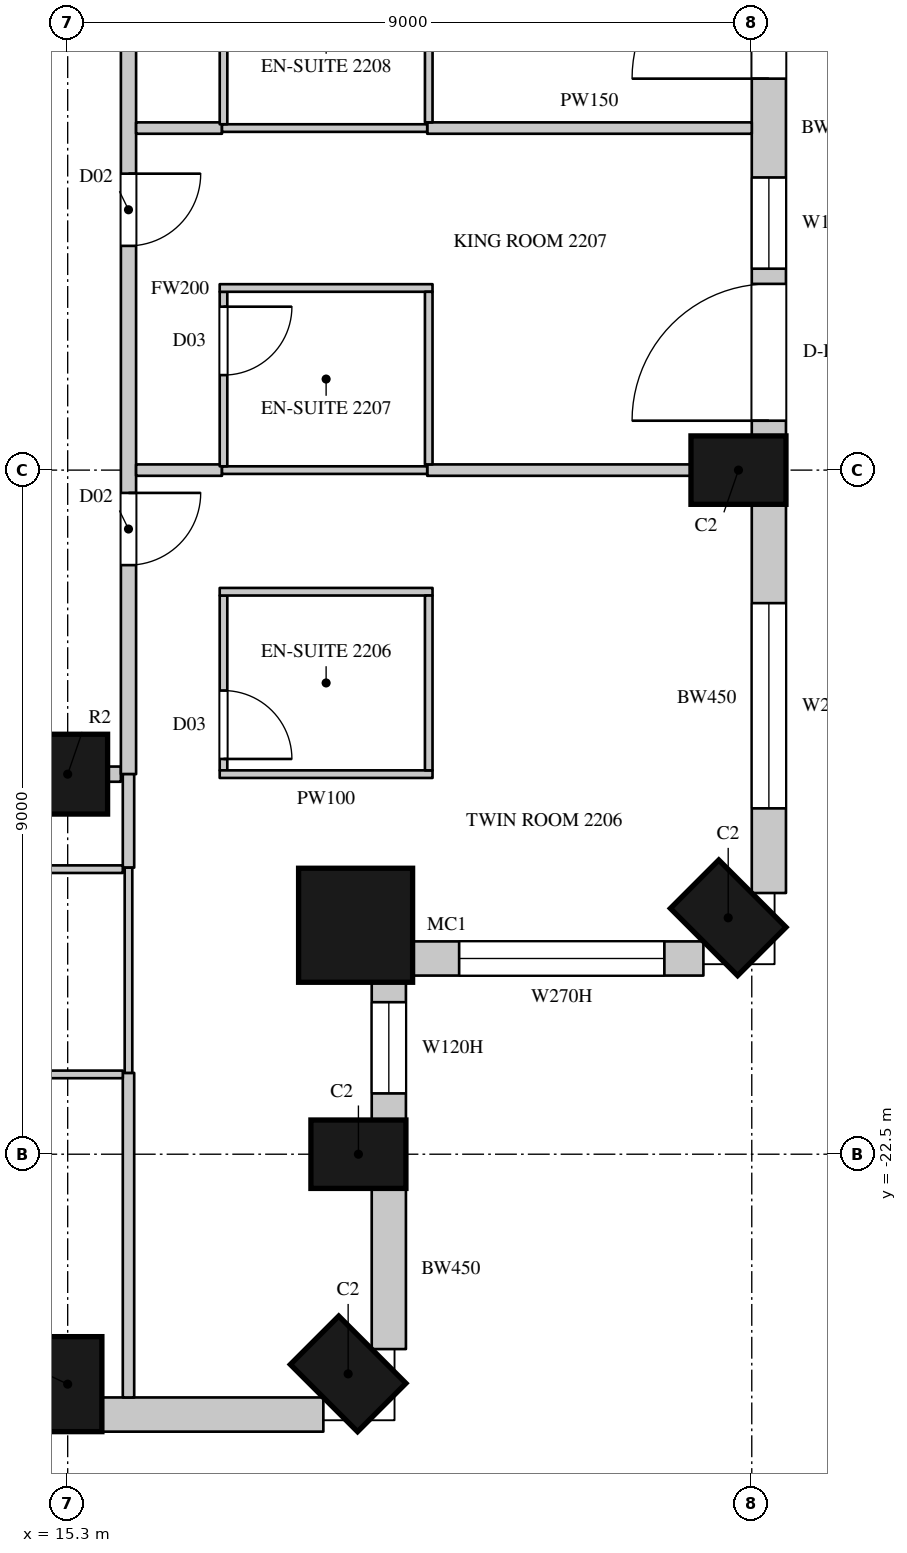
"""IFC4 building model, lengths in metres.
Left out: names, types, materials, properties, quantities, classifications, styles, units other than length and angle.
Written with IfcOpenShell. Run it as: python <this file> out.ifc"""

import sys

from ifc_helpers import new_model, si_unit, direction, frame, frame_2d, origin, origin_2d, place, context, subcontext, project, spatial, rectangle, circle, extrude, element, fill, save


model = new_model("IFC4")
c1 = context("Model", 3, precision=1e-05, world=origin(), true_north=direction((0.0, 1.0)))
c2 = subcontext(c1, "Body", "Model", "MODEL_VIEW")
j1 = project(units=[si_unit("LENGTHUNIT", "METRE"), si_unit("PLANEANGLEUNIT", "RADIAN")], contexts=[c1])
p1 = place(None, origin())
s1 = spatial("IfcSite", under=j1, at=p1, CompositionType="ELEMENT")
p2 = place(p1, origin())
s2 = spatial("IfcBuilding", under=s1, at=p2, CompositionType="ELEMENT")
p3 = place(p2, frame((0.0, 0.0, 109.5)))
s3 = spatial("IfcBuildingStorey", under=s2, at=p3, CompositionType="ELEMENT", Elevation=109.5)
for number, where, z_axis, x_axis in (
    (1, (15.3, -25.525, 0.0), (0.0, 0.0, 1.0), (1.0, 0.0, 0.0)),
    (2, (18.99, -25.39, 0.0), (0.0, 0.0, 1.0), (0.707, 0.707, 0.0)),
    (3, (19.125, -22.5, 0.0), (0.0, 0.0, 1.0), (0.0, 1.0, 0.0)),
):
    element("IfcColumn", number, at=place(p3, frame(where, z_axis=z_axis, x_axis=x_axis)), inside=s3, PredefinedType="COLUMN", context=c2, shape_type="SweptSolid", body=[
        extrude(rectangle(XDim=0.9, YDim=1.25, at=origin_2d()), origin(), (0.0, 0.0, 1.0), 3.6),
    ])
p4 = place(p3, frame((19.088, -19.488, 0.0), z_axis=(0.0, 0.0, 1.0), x_axis=(1.0, 0.0, 0.0)))
e4 = element("IfcColumn", 4, at=p4, inside=s3, PredefinedType="COLUMN", context=c2, shape_type="SweptSolid", body=[
    extrude(circle(Radius=0.75, at=origin_2d()), origin(), (0.0, 0.0, 1.0), 3.6),
])
for number, where, z_axis, x_axis in (
    (5, (23.99, -19.39, 0.0), (0.0, 0.0, 1.0), (0.707, 0.707, 0.0)),
    (6, (24.125, -13.5, 0.0), (0.0, 0.0, 1.0), (0.0, 1.0, 0.0)),
):
    element("IfcColumn", number, at=place(p3, frame(where, z_axis=z_axis, x_axis=x_axis)), inside=s3, PredefinedType="COLUMN", context=c2, shape_type="SweptSolid", body=[
        extrude(rectangle(XDim=0.9, YDim=1.25, at=origin_2d()), origin(), (0.0, 0.0, 1.0), 3.6),
    ])
p5 = place(p3, frame((15.3, -17.5, 0.0), z_axis=(0.0, 0.0, 1.0), x_axis=(1.0, 0.0, 0.0)))
e7 = element("IfcColumn", 7, at=p5, inside=s3, PredefinedType="COLUMN", context=c2, shape_type="SweptSolid", body=[
    extrude(circle(Radius=0.525, at=origin_2d()), origin(), (0.0, 0.0, 1.0), 3.6),
])
p6 = place(p3, frame((15.75, -25.925, 0.0), z_axis=(0.0, 0.0, 1.0), x_axis=(1.0, 0.0, 0.0)))
e8 = element("IfcWall", 8, at=p6, inside=s3, PredefinedType="SOLIDWALL", context=c2, shape_type="SweptSolid", body=[
    extrude(rectangle(XDim=2.914, YDim=0.45, at=frame_2d((1.457, 0.0))), origin(), (0.0, 0.0, 1.0), 3.3),
])
p7 = place(p3, frame((19.525, -25.064, 0.0), z_axis=(0.0, 0.0, 1.0), x_axis=(0.0, 1.0, 0.0)))
e9 = element("IfcWall", 9, at=p7, inside=s3, PredefinedType="SOLIDWALL", context=c2, shape_type="SweptSolid", body=[
    extrude(rectangle(XDim=2.114, YDim=0.45, at=frame_2d((1.057, 0.0))), origin(), (0.0, 0.0, 1.0), 3.3),
])
p8 = place(p3, frame((19.525, -22.05, 0.0), z_axis=(0.0, 0.0, 1.0), x_axis=(0.0, 1.0, 0.0)))
e10 = element("IfcWall", 10, at=p8, inside=s3, PredefinedType="SOLIDWALL", context=c2, shape_type="SweptSolid", body=[
    extrude(rectangle(XDim=1.843, YDim=0.45, at=frame_2d((0.921, 0.0))), origin(), (0.0, 0.0, 1.0), 3.3),
])
p9 = place(p8, frame((0.35, 0.0, 1.05)))
e11 = element("IfcOpeningElement", 11, at=p9, cuts=e10, PredefinedType="OPENING", context=c2, shape_type="SweptSolid", body=[
    extrude(rectangle(XDim=1.2, YDim=2.0, at=frame_2d((0.6, 1.0))), frame((0.0, 0.235, 0.0), z_axis=(0.0, -1.0, 0.0), x_axis=(1.0, 0.0, 0.0)), (0.0, 0.0, 1.0), 0.47),
])
p10 = place(p3, frame((19.807, -19.925, 0.0), z_axis=(0.0, 0.0, 1.0), x_axis=(1.0, 0.0, 0.0)))
e12 = element("IfcWall", 12, at=p10, inside=s3, PredefinedType="SOLIDWALL", context=c2, shape_type="SweptSolid", body=[
    extrude(rectangle(XDim=3.857, YDim=0.45, at=frame_2d((1.928, 0.0))), origin(), (0.0, 0.0, 1.0), 3.3),
])
p11 = place(p10, frame((0.643, 0.0, 1.05)))
e13 = element("IfcOpeningElement", 13, at=p11, cuts=e12, PredefinedType="OPENING", context=c2, shape_type="SweptSolid", body=[
    extrude(rectangle(XDim=2.7, YDim=2.0, at=frame_2d((1.35, 1.0))), frame((0.0, 0.235, 0.0), z_axis=(0.0, -1.0, 0.0), x_axis=(1.0, 0.0, 0.0)), (0.0, 0.0, 1.0), 0.47),
])
p12 = place(p3, frame((24.525, -19.064, 0.0), z_axis=(0.0, 0.0, 1.0), x_axis=(0.0, 1.0, 0.0)))
e14 = element("IfcWall", 14, at=p12, inside=s3, PredefinedType="SOLIDWALL", context=c2, shape_type="SweptSolid", body=[
    extrude(rectangle(XDim=5.114, YDim=0.45, at=frame_2d((2.557, 0.0))), origin(), (0.0, 0.0, 1.0), 3.3),
])
p13 = place(p12, frame((1.114, 0.0, 1.05)))
e15 = element("IfcOpeningElement", 15, at=p13, cuts=e14, PredefinedType="OPENING", context=c2, shape_type="SweptSolid", body=[
    extrude(rectangle(XDim=2.7, YDim=2.0, at=frame_2d((1.35, 1.0))), frame((0.0, 0.235, 0.0), z_axis=(0.0, -1.0, 0.0), x_axis=(1.0, 0.0, 0.0)), (0.0, 0.0, 1.0), 0.47),
])
p14 = place(p3, frame((24.525, -13.05, 0.0), z_axis=(0.0, 0.0, 1.0), x_axis=(0.0, 1.0, 0.0)))
e16 = element("IfcWall", 16, at=p14, inside=s3, PredefinedType="SOLIDWALL", context=c2, shape_type="SweptSolid", body=[
    extrude(rectangle(XDim=8.1, YDim=0.45, at=frame_2d((4.05, 0.0))), origin(), (0.0, 0.0, 1.0), 3.3),
])
p15 = place(p14, frame((0.2, 0.0, 0.0)))
e17 = element("IfcOpeningElement", 17, at=p15, cuts=e16, PredefinedType="OPENING", context=c2, shape_type="SweptSolid", body=[
    extrude(rectangle(XDim=1.8, YDim=2.4, at=frame_2d((0.9, 1.2))), frame((0.0, 0.235, 0.0), z_axis=(0.0, -1.0, 0.0), x_axis=(1.0, 0.0, 0.0)), (0.0, 0.0, 1.0), 0.47),
])
p16 = place(p14, frame((2.2, 0.0, 1.05)))
e18 = element("IfcOpeningElement", 18, at=p16, cuts=e16, PredefinedType="OPENING", context=c2, shape_type="SweptSolid", body=[
    extrude(rectangle(XDim=1.2, YDim=2.0, at=frame_2d((0.6, 1.0))), frame((0.0, 0.235, 0.0), z_axis=(0.0, -1.0, 0.0), x_axis=(1.0, 0.0, 0.0)), (0.0, 0.0, 1.0), 0.47),
])
p17 = place(p14, frame((4.7, 0.0, 0.0)))
e19 = element("IfcOpeningElement", 19, at=p17, cuts=e16, PredefinedType="OPENING", context=c2, shape_type="SweptSolid", body=[
    extrude(rectangle(XDim=1.8, YDim=2.4, at=frame_2d((0.9, 1.2))), frame((0.0, 0.235, 0.0), z_axis=(0.0, -1.0, 0.0), x_axis=(1.0, 0.0, 0.0)), (0.0, 0.0, 1.0), 0.47),
])
p18 = place(p14, frame((6.7, 0.0, 1.05)))
e20 = element("IfcOpeningElement", 20, at=p18, cuts=e16, PredefinedType="OPENING", context=c2, shape_type="SweptSolid", body=[
    extrude(rectangle(XDim=1.2, YDim=2.0, at=frame_2d((0.6, 1.0))), frame((0.0, 0.235, 0.0), z_axis=(0.0, -1.0, 0.0), x_axis=(1.0, 0.0, 0.0)), (0.0, 0.0, 1.0), 0.47),
])
p19 = place(p3, frame((15.825, -17.5, 0.0), z_axis=(0.0, 0.0, 1.0), x_axis=(1.0, 0.0, 0.0)))
e21 = element("IfcWall", 21, at=p19, inside=s3, PredefinedType="PARTITIONING", context=c2, shape_type="SweptSolid", body=[
    extrude(rectangle(XDim=0.175, YDim=0.2, at=frame_2d((0.087, 0.0))), origin(), (0.0, 0.0, 1.0), 3.3),
])
p20 = place(p3, frame((16.1, -17.5, 0.0), z_axis=(0.0, 0.0, 1.0), x_axis=(0.0, 1.0, 0.0)))
e22 = element("IfcWall", 22, at=p20, inside=s3, PredefinedType="PARTITIONING", context=c2, shape_type="SweptSolid", body=[
    extrude(rectangle(XDim=12.75, YDim=0.2, at=frame_2d((6.375, 0.0))), origin(), (0.0, 0.0, 1.0), 3.3),
])
p21 = place(p20, frame((2.75, 0.0, 0.0)))
e23 = element("IfcOpeningElement", 23, at=p21, cuts=e22, PredefinedType="OPENING", context=c2, shape_type="SweptSolid", body=[
    extrude(rectangle(XDim=0.95, YDim=2.2, at=frame_2d((0.475, 1.1))), frame((0.0, 0.11, 0.0), z_axis=(0.0, -1.0, 0.0), x_axis=(1.0, 0.0, 0.0)), (0.0, 0.0, 1.0), 0.22),
])
p22 = place(p20, frame((6.95, 0.0, 0.0)))
e24 = element("IfcOpeningElement", 24, at=p22, cuts=e22, PredefinedType="OPENING", context=c2, shape_type="SweptSolid", body=[
    extrude(rectangle(XDim=0.95, YDim=2.2, at=frame_2d((0.475, 1.1))), frame((0.0, 0.11, 0.0), z_axis=(0.0, -1.0, 0.0), x_axis=(1.0, 0.0, 0.0)), (0.0, 0.0, 1.0), 0.22),
])
p23 = place(p20, frame((11.4, 0.0, 0.0)))
e25 = element("IfcOpeningElement", 25, at=p23, cuts=e22, PredefinedType="OPENING", context=c2, shape_type="SweptSolid", body=[
    extrude(rectangle(XDim=0.95, YDim=2.2, at=frame_2d((0.475, 1.1))), frame((0.0, 0.11, 0.0), z_axis=(0.0, -1.0, 0.0), x_axis=(1.0, 0.0, 0.0)), (0.0, 0.0, 1.0), 0.22),
])
p24 = place(p3, frame((16.1, -25.7, 0.0), z_axis=(0.0, 0.0, 1.0), x_axis=(0.0, 1.0, 0.0)))
e26 = element("IfcWall", 26, at=p24, inside=s3, PredefinedType="PARTITIONING", context=c2, shape_type="SweptSolid", body=[
    extrude(rectangle(XDim=4.27, YDim=0.15, at=frame_2d((2.135, 0.0))), origin(), (0.0, 0.0, 1.0), 3.3),
])
p25 = place(p3, frame((16.1, -18.73, 0.0), z_axis=(0.0, 0.0, 1.0), x_axis=(0.0, 1.0, 0.0)))
e27 = element("IfcWall", 27, at=p25, inside=s3, PredefinedType="PARTITIONING", context=c2, shape_type="SweptSolid", body=[
    extrude(rectangle(XDim=1.23, YDim=0.15, at=frame_2d((0.615, 0.0))), origin(), (0.0, 0.0, 1.0), 3.3),
])
p26 = place(p3, frame((16.2, -13.5, 0.0), z_axis=(0.0, 0.0, 1.0), x_axis=(1.0, 0.0, 0.0)))
e28 = element("IfcWall", 28, at=p26, inside=s3, PredefinedType="PARTITIONING", context=c2, shape_type="SweptSolid", body=[
    extrude(rectangle(XDim=1.13, YDim=0.15, at=frame_2d((0.565, 0.0))), origin(), (0.0, 0.0, 1.0), 3.3),
])
p27 = place(p3, frame((16.2, -9.0, 0.0), z_axis=(0.0, 0.0, 1.0), x_axis=(1.0, 0.0, 0.0)))
e29 = element("IfcWall", 29, at=p27, inside=s3, PredefinedType="PARTITIONING", context=c2, shape_type="SweptSolid", body=[
    extrude(rectangle(XDim=1.13, YDim=0.15, at=frame_2d((0.565, 0.0))), origin(), (0.0, 0.0, 1.0), 2.65),
])
p28 = place(p3, frame((20.03, -13.5, 0.0), z_axis=(0.0, 0.0, 1.0), x_axis=(1.0, 0.0, 0.0)))
e30 = element("IfcWall", 30, at=p28, inside=s3, PredefinedType="PARTITIONING", context=c2, shape_type="SweptSolid", body=[
    extrude(rectangle(XDim=3.47, YDim=0.15, at=frame_2d((1.735, 0.0))), origin(), (0.0, 0.0, 1.0), 3.3),
])
p29 = place(p3, frame((20.03, -9.0, 0.0), z_axis=(0.0, 0.0, 1.0), x_axis=(1.0, 0.0, 0.0)))
e31 = element("IfcWall", 31, at=p29, inside=s3, PredefinedType="PARTITIONING", context=c2, shape_type="SweptSolid", body=[
    extrude(rectangle(XDim=4.27, YDim=0.15, at=frame_2d((2.135, 0.0))), origin(), (0.0, 0.0, 1.0), 2.65),
])
for number, where, z_axis, x_axis in (
    (32, (13.65, -21.45, 0.0), (0.0, 0.0, 1.0), (1.0, 0.0, 0.0)),
    (33, (13.65, -18.75, 0.0), (0.0, 0.0, 1.0), (1.0, 0.0, 0.0)),
):
    element("IfcWall", number, at=place(p3, frame(where, z_axis=z_axis, x_axis=x_axis)), inside=s3, PredefinedType="PARTITIONING", context=c2, shape_type="SweptSolid", body=[
        extrude(rectangle(XDim=2.375, YDim=0.1, at=frame_2d((1.188, 0.0))), origin(), (0.0, 0.0, 1.0), 3.3),
    ])
for number, where, z_axis, x_axis in (
    (34, (16.1, -21.43, 0.0), (0.0, 0.0, 1.0), (0.0, 1.0, 0.0)),
    (35, (17.33, -13.5, 0.0), (0.0, 0.0, 1.0), (1.0, 0.0, 0.0)),
):
    element("IfcWall", number, at=place(p3, frame(where, z_axis=z_axis, x_axis=x_axis)), inside=s3, PredefinedType="PARTITIONING", context=c2, shape_type="SweptSolid", body=[
        extrude(rectangle(XDim=2.7, YDim=0.1, at=frame_2d((1.35, 0.0))), origin(), (0.0, 0.0, 1.0), 3.3),
    ])
p30 = place(p3, frame((17.33, -9.0, 0.0), z_axis=(0.0, 0.0, 1.0), x_axis=(1.0, 0.0, 0.0)))
e36 = element("IfcWall", 36, at=p30, inside=s3, PredefinedType="PARTITIONING", context=c2, shape_type="SweptSolid", body=[
    extrude(rectangle(XDim=2.7, YDim=0.1, at=frame_2d((1.35, 0.0))), origin(), (0.0, 0.0, 1.0), 2.65),
])
p31 = place(p3, frame((17.35, -17.45, 0.0), z_axis=(0.0, 0.0, 1.0), x_axis=(0.0, 1.0, 0.0)))
e37 = element("IfcWall", 37, at=p31, inside=s3, PredefinedType="PARTITIONING", context=c2, shape_type="SweptSolid", body=[
    extrude(rectangle(XDim=2.3, YDim=0.1, at=frame_2d((1.15, 0.0))), origin(), (0.0, 0.0, 1.0), 3.3),
])
p32 = place(p31, frame((0.15, 0.0, 0.0)))
e38 = element("IfcOpeningElement", 38, at=p32, cuts=e37, PredefinedType="OPENING", context=c2, shape_type="SweptSolid", body=[
    extrude(rectangle(XDim=0.9, YDim=2.2, at=frame_2d((0.45, 1.1))), frame((0.0, 0.06, 0.0), z_axis=(0.0, -1.0, 0.0), x_axis=(1.0, 0.0, 0.0)), (0.0, 0.0, 1.0), 0.12),
])
for number, where, z_axis, x_axis in (
    (39, (17.3, -17.5, 0.0), (0.0, 0.0, 1.0), (1.0, 0.0, 0.0)),
    (40, (17.3, -15.1, 0.0), (0.0, 0.0, 1.0), (1.0, 0.0, 0.0)),
):
    element("IfcWall", number, at=place(p3, frame(where, z_axis=z_axis, x_axis=x_axis)), inside=s3, PredefinedType="PARTITIONING", context=c2, shape_type="SweptSolid", body=[
        extrude(rectangle(XDim=2.8, YDim=0.1, at=frame_2d((1.4, 0.0))), origin(), (0.0, 0.0, 1.0), 3.3),
    ])
p33 = place(p3, frame((17.35, -13.45, 0.0), z_axis=(0.0, 0.0, 1.0), x_axis=(0.0, 1.0, 0.0)))
e41 = element("IfcWall", 41, at=p33, inside=s3, PredefinedType="PARTITIONING", context=c2, shape_type="SweptSolid", body=[
    extrude(rectangle(XDim=2.296, YDim=0.1, at=frame_2d((1.148, 0.0))), origin(), (0.0, 0.0, 1.0), 3.3),
])
p34 = place(p33, frame((1.2, 0.0, 0.0)))
e42 = element("IfcOpeningElement", 42, at=p34, cuts=e41, PredefinedType="OPENING", context=c2, shape_type="SweptSolid", body=[
    extrude(rectangle(XDim=0.9, YDim=2.2, at=frame_2d((0.45, 1.1))), frame((0.0, 0.06, 0.0), z_axis=(0.0, -1.0, 0.0), x_axis=(1.0, 0.0, 0.0)), (0.0, 0.0, 1.0), 0.12),
])
p35 = place(p3, frame((17.3, -11.104, 0.0), z_axis=(0.0, 0.0, 1.0), x_axis=(1.0, 0.0, 0.0)))
e43 = element("IfcWall", 43, at=p35, inside=s3, PredefinedType="PARTITIONING", context=c2, shape_type="SweptSolid", body=[
    extrude(rectangle(XDim=2.8, YDim=0.1, at=frame_2d((1.4, 0.0))), origin(), (0.0, 0.0, 1.0), 3.3),
])
p36 = place(p3, frame((17.35, -8.95, 0.0), z_axis=(0.0, 0.0, 1.0), x_axis=(0.000407580973, 0.999999916939, 0.0)))
e44 = element("IfcWall", 44, at=p36, inside=s3, PredefinedType="PARTITIONING", context=c2, shape_type="SweptSolid", body=[
    extrude(rectangle(XDim=2.396, YDim=0.1, at=frame_2d((1.198, 0.0))), origin(), (0.0, 0.0, 1.0), 3.3),
])
p37 = place(p36, frame((1.25, 0.0, 0.0)))
e45 = element("IfcOpeningElement", 45, at=p37, cuts=e44, PredefinedType="OPENING", context=c2, shape_type="SweptSolid", body=[
    extrude(rectangle(XDim=0.9, YDim=2.2, at=frame_2d((0.45, 1.1))), frame((0.0, 0.06, 0.0), z_axis=(0.0, -1.0, 0.0), x_axis=(1.0, 0.0, 0.0)), (0.0, 0.0, 1.0), 0.12),
])
p38 = place(p3, frame((20.05, -17.45, 0.0), z_axis=(0.0, 0.0, 1.0), x_axis=(0.0, 1.0, 0.0)))
e46 = element("IfcWall", 46, at=p38, inside=s3, PredefinedType="PARTITIONING", context=c2, shape_type="SweptSolid", body=[
    extrude(rectangle(XDim=2.3, YDim=0.1, at=frame_2d((1.15, 0.0))), origin(), (0.0, 0.0, 1.0), 3.3),
])
p39 = place(p3, frame((20.05, -13.425, 0.0), z_axis=(0.0, 0.0, 1.0), x_axis=(0.0, 1.0, 0.0)))
e47 = element("IfcWall", 47, at=p39, inside=s3, PredefinedType="PARTITIONING", context=c2, shape_type="SweptSolid", body=[
    extrude(rectangle(XDim=2.271, YDim=0.1, at=frame_2d((1.135, 0.0))), origin(), (0.0, 0.0, 1.0), 3.3),
])
p40 = place(p3, frame((20.05, -8.925, 0.0), z_axis=(0.0, 0.0, 1.0), x_axis=(0.000430200003, 0.999999907464, 0.0)))
e48 = element("IfcWall", 48, at=p40, inside=s3, PredefinedType="PARTITIONING", context=c2, shape_type="SweptSolid", body=[
    extrude(rectangle(XDim=2.27, YDim=0.1, at=frame_2d((1.135, 0.0))), origin(), (0.0, 0.0, 1.0), 3.3),
])
p41 = place(p9, origin())
e49 = element("IfcWindow", 49, at=p41, inside=s3, PartitioningType="SINGLE_PANEL", PredefinedType="WINDOW", context=c2, shape_type="SweptSolid", body=[
    extrude(rectangle(XDim=1.2, YDim=2.0, at=frame_2d((0.6, 1.0))), frame((0.0, 0.135, 0.0), z_axis=(0.0, -1.0, 0.0), x_axis=(1.0, 0.0, 0.0)), (0.0, 0.0, 1.0), 0.06),
])
fill(e11, e49)
p42 = place(p11, origin())
e50 = element("IfcWindow", 50, at=p42, inside=s3, PartitioningType="SINGLE_PANEL", PredefinedType="WINDOW", context=c2, shape_type="SweptSolid", body=[
    extrude(rectangle(XDim=2.7, YDim=2.0, at=frame_2d((1.35, 1.0))), frame((0.0, 0.135, 0.0), z_axis=(0.0, -1.0, 0.0), x_axis=(1.0, 0.0, 0.0)), (0.0, 0.0, 1.0), 0.06),
])
fill(e13, e50)
p43 = place(p13, origin())
e51 = element("IfcWindow", 51, at=p43, inside=s3, PartitioningType="SINGLE_PANEL", PredefinedType="WINDOW", context=c2, shape_type="SweptSolid", body=[
    extrude(rectangle(XDim=2.7, YDim=2.0, at=frame_2d((1.35, 1.0))), frame((0.0, 0.135, 0.0), z_axis=(0.0, -1.0, 0.0), x_axis=(1.0, 0.0, 0.0)), (0.0, 0.0, 1.0), 0.06),
])
fill(e15, e51)
p44 = place(p15, origin())
e52 = element("IfcDoor", 52, at=p44, inside=s3, OperationType="SLIDING_TO_LEFT", PredefinedType="DOOR", context=c2, shape_type="SweptSolid", body=[
    extrude(rectangle(XDim=1.8, YDim=2.4, at=frame_2d((0.9, 1.2))), frame((0.0, 0.13, 0.0), z_axis=(0.0, -1.0, 0.0), x_axis=(1.0, 0.0, 0.0)), (0.0, 0.0, 1.0), 0.05),
])
fill(e17, e52)
p45 = place(p16, origin())
e53 = element("IfcWindow", 53, at=p45, inside=s3, PartitioningType="SINGLE_PANEL", PredefinedType="WINDOW", context=c2, shape_type="SweptSolid", body=[
    extrude(rectangle(XDim=1.2, YDim=2.0, at=frame_2d((0.6, 1.0))), frame((0.0, 0.135, 0.0), z_axis=(0.0, -1.0, 0.0), x_axis=(1.0, 0.0, 0.0)), (0.0, 0.0, 1.0), 0.06),
])
fill(e18, e53)
p46 = place(p17, origin())
e54 = element("IfcDoor", 54, at=p46, inside=s3, OperationType="SLIDING_TO_LEFT", PredefinedType="DOOR", context=c2, shape_type="SweptSolid", body=[
    extrude(rectangle(XDim=1.8, YDim=2.4, at=frame_2d((0.9, 1.2))), frame((0.0, 0.13, 0.0), z_axis=(0.0, -1.0, 0.0), x_axis=(1.0, 0.0, 0.0)), (0.0, 0.0, 1.0), 0.05),
])
fill(e19, e54)
p47 = place(p21, origin())
e55 = element("IfcDoor", 55, at=p47, inside=s3, OperationType="SINGLE_SWING_LEFT", PredefinedType="DOOR", context=c2, shape_type="SweptSolid", body=[
    extrude(rectangle(XDim=0.95, YDim=2.2, at=frame_2d((0.475, 1.1))), frame((0.0, 0.025, 0.0), z_axis=(0.0, -1.0, 0.0), x_axis=(1.0, 0.0, 0.0)), (0.0, 0.0, 1.0), 0.05),
])
fill(e23, e55)
p48 = place(p32, origin())
e56 = element("IfcDoor", 56, at=p48, inside=s3, OperationType="SINGLE_SWING_RIGHT", PredefinedType="DOOR", context=c2, shape_type="SweptSolid", body=[
    extrude(rectangle(XDim=0.9, YDim=2.2, at=frame_2d((0.45, 1.1))), frame((0.0, 0.025, 0.0), z_axis=(0.0, -1.0, 0.0), x_axis=(1.0, 0.0, 0.0)), (0.0, 0.0, 1.0), 0.05),
])
fill(e38, e56)
p49 = place(p22, origin())
e57 = element("IfcDoor", 57, at=p49, inside=s3, OperationType="SINGLE_SWING_LEFT", PredefinedType="DOOR", context=c2, shape_type="SweptSolid", body=[
    extrude(rectangle(XDim=0.95, YDim=2.2, at=frame_2d((0.475, 1.1))), frame((0.0, 0.025, 0.0), z_axis=(0.0, -1.0, 0.0), x_axis=(1.0, 0.0, 0.0)), (0.0, 0.0, 1.0), 0.05),
])
fill(e24, e57)
p50 = place(p34, origin())
e58 = element("IfcDoor", 58, at=p50, inside=s3, OperationType="SINGLE_SWING_LEFT", PredefinedType="DOOR", context=c2, shape_type="SweptSolid", body=[
    extrude(rectangle(XDim=0.9, YDim=2.2, at=frame_2d((0.45, 1.1))), frame((0.0, 0.025, 0.0), z_axis=(0.0, -1.0, 0.0), x_axis=(1.0, 0.0, 0.0)), (0.0, 0.0, 1.0), 0.05),
])
fill(e42, e58)
save(model, sys.argv[1])
